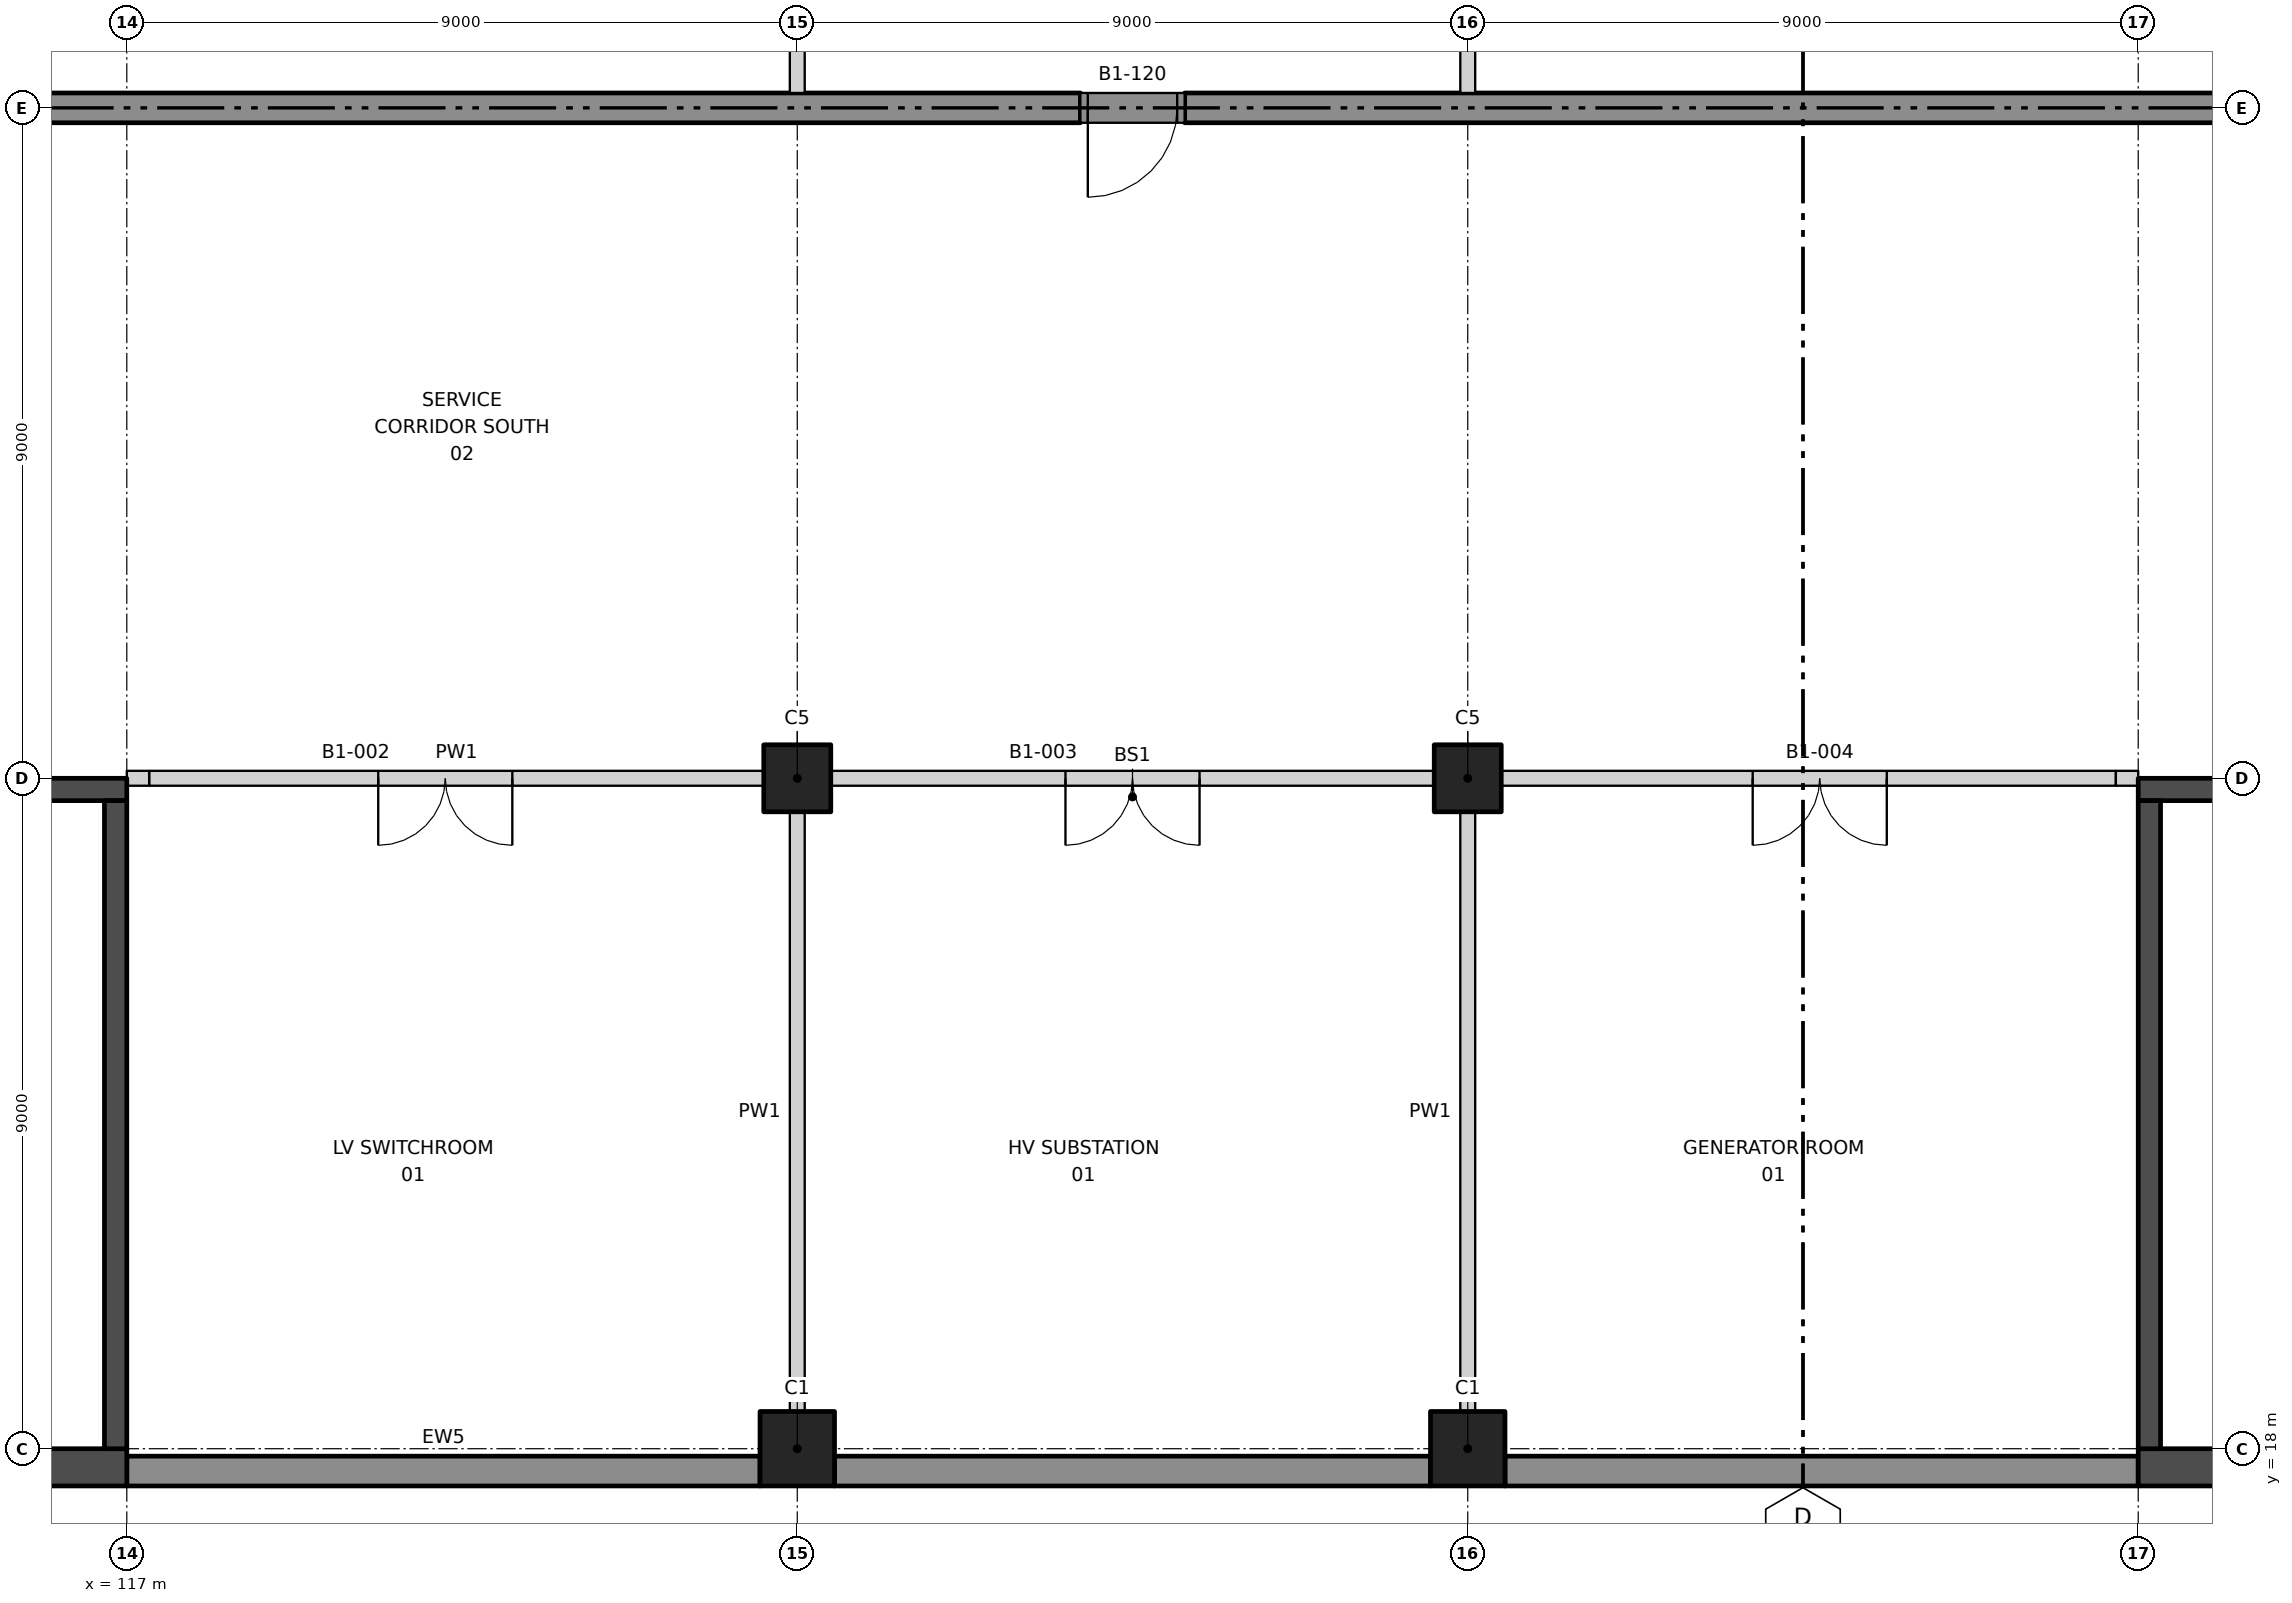
"""IFC4 building model, lengths in metres.
Left out: names, types, materials, properties, quantities, classifications, styles, units other than length and angle.
Written with IfcOpenShell. Run it as: python <this file> out.ifc"""

import sys

from ifc_helpers import new_model, si_unit, direction, frame, frame_2d, origin, origin_2d, place, context, subcontext, project, spatial, rectangle, extrude, element, fill, save


model = new_model("IFC4")
c1 = context("Model", 3, precision=1e-05, world=origin(), true_north=direction((0.0, 1.0)))
c2 = subcontext(c1, "Body", "Model", "MODEL_VIEW")
j1 = project(units=[si_unit("LENGTHUNIT", "METRE"), si_unit("PLANEANGLEUNIT", "RADIAN")], contexts=[c1])
p1 = place(None, origin())
s1 = spatial("IfcSite", under=j1, at=p1, CompositionType="ELEMENT")
p2 = place(p1, origin())
s2 = spatial("IfcBuilding", under=s1, at=p2, CompositionType="ELEMENT")
p3 = place(p2, frame((0.0, 0.0, -6.0)))
s3 = spatial("IfcBuildingStorey", under=s2, at=p3, CompositionType="ELEMENT", Elevation=-6.0)
for number, where, z_axis, x_axis in (
    (1, (126.0, 18.0, 0.0), (0.0, 0.0, 1.0), (1.0, 0.0, 0.0)),
    (2, (135.0, 18.0, 0.0), (0.0, 0.0, 1.0), (1.0, 0.0, 0.0)),
):
    element("IfcColumn", number, at=place(p3, frame(where, z_axis=z_axis, x_axis=x_axis)), inside=s3, PredefinedType="COLUMN", context=c2, shape_type="SweptSolid", body=[
        extrude(rectangle(XDim=1.0, YDim=1.0, at=origin_2d()), origin(), (0.0, 0.0, 1.0), 6.0),
    ])
for number, where, z_axis, x_axis in (
    (3, (126.0, 27.0, 0.0), (0.0, 0.0, 1.0), (1.0, 0.0, 0.0)),
    (4, (135.0, 27.0, 0.0), (0.0, 0.0, 1.0), (1.0, 0.0, 0.0)),
):
    element("IfcColumn", number, at=place(p3, frame(where, z_axis=z_axis, x_axis=x_axis)), inside=s3, PredefinedType="COLUMN", context=c2, shape_type="SweptSolid", body=[
        extrude(rectangle(XDim=0.9, YDim=0.9, at=origin_2d()), origin(), (0.0, 0.0, 1.0), 6.0),
    ])
for number, where, z_axis, x_axis in (
    (5, (90.0, 36.0, 0.0), (0.0, 0.0, 1.0), (1.0, 0.0, 0.0)),
    (6, (131.2, 36.0, 0.0), (0.0, 0.0, 1.0), (1.0, 0.0, 0.0)),
):
    element("IfcWall", number, at=place(p3, frame(where, z_axis=z_axis, x_axis=x_axis)), inside=s3, PredefinedType="SOLIDWALL", context=c2, shape_type="SweptSolid", body=[
        extrude(rectangle(XDim=39.8, YDim=0.4, at=frame_2d((19.9, 0.0))), origin(), (0.0, 0.0, 1.0), 6.0),
    ])
p4 = place(p3, frame((129.8, 36.0, 0.0), z_axis=(0.0, 0.0, 1.0), x_axis=(1.0, 0.0, 0.0)))
e7 = element("IfcWall", 7, at=p4, inside=s3, PredefinedType="SOLIDWALL", context=c2, shape_type="SweptSolid", body=[
    extrude(rectangle(XDim=1.4, YDim=0.4, at=frame_2d((0.7, 0.0))), origin(), (0.0, 0.0, 1.0), 5.0),
])
p5 = place(p4, frame((0.1, 0.0, 0.0)))
e8 = element("IfcOpeningElement", 8, at=p5, cuts=e7, PredefinedType="OPENING", context=c2, shape_type="SweptSolid", body=[
    extrude(rectangle(XDim=1.2, YDim=2.1, at=frame_2d((0.6, 1.05))), frame((0.0, 0.21, 0.0), z_axis=(0.0, -1.0, 0.0), x_axis=(1.0, 0.0, 0.0)), (0.0, 0.0, 1.0), 0.42),
])
p6 = place(p3, frame((117.3, 27.0, 0.0), z_axis=(0.0, 0.0, 1.0), x_axis=(1.0, 0.0, 0.0)))
e9 = element("IfcWall", 9, at=p6, inside=s3, PredefinedType="PARTITIONING", context=c2, shape_type="SweptSolid", body=[
    extrude(rectangle(XDim=8.25, YDim=0.2, at=frame_2d((4.125, 0.0))), origin(), (0.0, 0.0, 1.0), 4.65),
])
p7 = place(p6, frame((3.075, 0.0, 0.0)))
e10 = element("IfcOpeningElement", 10, at=p7, cuts=e9, PredefinedType="OPENING", context=c2, shape_type="SweptSolid", body=[
    extrude(rectangle(XDim=1.8, YDim=2.1, at=frame_2d((0.9, 1.05))), frame((0.0, 0.11, 0.0), z_axis=(0.0, -1.0, 0.0), x_axis=(1.0, 0.0, 0.0)), (0.0, 0.0, 1.0), 0.22),
])
p8 = place(p3, frame((126.45, 27.0, 0.0), z_axis=(0.0, 0.0, 1.0), x_axis=(1.0, 0.0, 0.0)))
e11 = element("IfcWall", 11, at=p8, inside=s3, PredefinedType="PARTITIONING", context=c2, shape_type="SweptSolid", body=[
    extrude(rectangle(XDim=8.1, YDim=0.2, at=frame_2d((4.05, 0.0))), origin(), (0.0, 0.0, 1.0), 4.65),
])
p9 = place(p8, frame((3.15, 0.0, 0.0)))
e12 = element("IfcOpeningElement", 12, at=p9, cuts=e11, PredefinedType="OPENING", context=c2, shape_type="SweptSolid", body=[
    extrude(rectangle(XDim=1.8, YDim=2.1, at=frame_2d((0.9, 1.05))), frame((0.0, 0.11, 0.0), z_axis=(0.0, -1.0, 0.0), x_axis=(1.0, 0.0, 0.0)), (0.0, 0.0, 1.0), 0.22),
])
p10 = place(p3, frame((135.45, 27.0, 0.0), z_axis=(0.0, 0.0, 1.0), x_axis=(1.0, 0.0, 0.0)))
e13 = element("IfcWall", 13, at=p10, inside=s3, PredefinedType="PARTITIONING", context=c2, shape_type="SweptSolid", body=[
    extrude(rectangle(XDim=8.25, YDim=0.2, at=frame_2d((4.125, 0.0))), origin(), (0.0, 0.0, 1.0), 4.65),
])
p11 = place(p10, frame((3.375, 0.0, 0.0)))
e14 = element("IfcOpeningElement", 14, at=p11, cuts=e13, PredefinedType="OPENING", context=c2, shape_type="SweptSolid", body=[
    extrude(rectangle(XDim=1.8, YDim=2.1, at=frame_2d((0.9, 1.05))), frame((0.0, 0.11, 0.0), z_axis=(0.0, -1.0, 0.0), x_axis=(1.0, 0.0, 0.0)), (0.0, 0.0, 1.0), 0.22),
])
p12 = place(p3, frame((126.0, 18.5, 0.0), z_axis=(0.0, 0.0, 1.0), x_axis=(0.0, 1.0, 0.0)))
e15 = element("IfcWall", 15, at=p12, inside=s3, PredefinedType="PARTITIONING", context=c2, shape_type="SweptSolid", body=[
    extrude(rectangle(XDim=8.05, YDim=0.2, at=frame_2d((4.025, 0.0))), origin(), (0.0, 0.0, 1.0), 4.65),
])
p13 = place(p3, frame((126.0, 36.2, 0.0), z_axis=(0.0, 0.0, 1.0), x_axis=(0.0, 1.0, 0.0)))
e16 = element("IfcWall", 16, at=p13, inside=s3, PredefinedType="PARTITIONING", context=c2, shape_type="SweptSolid", body=[
    extrude(rectangle(XDim=8.3, YDim=0.2, at=frame_2d((4.15, 0.0))), origin(), (0.0, 0.0, 1.0), 4.65),
])
p14 = place(p13, frame((3.3, 0.0, 0.0)))
e17 = element("IfcOpeningElement", 17, at=p14, cuts=e16, PredefinedType="OPENING", context=c2, shape_type="SweptSolid", body=[
    extrude(rectangle(XDim=1.0, YDim=2.1, at=frame_2d((0.5, 1.05))), frame((0.0, 0.11, 0.0), z_axis=(0.0, -1.0, 0.0), x_axis=(1.0, 0.0, 0.0)), (0.0, 0.0, 1.0), 0.22),
])
p15 = place(p3, frame((135.0, 18.5, 0.0), z_axis=(0.0, 0.0, 1.0), x_axis=(0.0, 1.0, 0.0)))
e18 = element("IfcWall", 18, at=p15, inside=s3, PredefinedType="PARTITIONING", context=c2, shape_type="SweptSolid", body=[
    extrude(rectangle(XDim=8.05, YDim=0.2, at=frame_2d((4.025, 0.0))), origin(), (0.0, 0.0, 1.0), 4.65),
])
p16 = place(p3, frame((135.0, 36.2, 0.0), z_axis=(0.0, 0.0, 1.0), x_axis=(0.0, 1.0, 0.0)))
e19 = element("IfcWall", 19, at=p16, inside=s3, PredefinedType="PARTITIONING", context=c2, shape_type="SweptSolid", body=[
    extrude(rectangle(XDim=8.3, YDim=0.2, at=frame_2d((4.15, 0.0))), origin(), (0.0, 0.0, 1.0), 4.65),
])
p17 = place(p16, frame((3.3, 0.0, 0.0)))
e20 = element("IfcOpeningElement", 20, at=p17, cuts=e19, PredefinedType="OPENING", context=c2, shape_type="SweptSolid", body=[
    extrude(rectangle(XDim=1.0, YDim=2.1, at=frame_2d((0.5, 1.05))), frame((0.0, 0.11, 0.0), z_axis=(0.0, -1.0, 0.0), x_axis=(1.0, 0.0, 0.0)), (0.0, 0.0, 1.0), 0.22),
])
p18 = place(p3, frame((117.0, 17.7, 0.0), z_axis=(0.0, 0.0, 1.0), x_axis=(1.0, 0.0, 0.0)))
e21 = element("IfcWall", 21, at=p18, inside=s3, PredefinedType="SOLIDWALL", context=c2, shape_type="SweptSolid", body=[
    extrude(rectangle(XDim=8.5, YDim=0.4, at=frame_2d((4.25, 0.0))), origin(), (0.0, 0.0, 1.0), 6.0),
])
p19 = place(p3, frame((126.5, 17.7, 0.0), z_axis=(0.0, 0.0, 1.0), x_axis=(1.0, 0.0, 0.0)))
e22 = element("IfcWall", 22, at=p19, inside=s3, PredefinedType="SOLIDWALL", context=c2, shape_type="SweptSolid", body=[
    extrude(rectangle(XDim=8.0, YDim=0.4, at=frame_2d((4.0, 0.0))), origin(), (0.0, 0.0, 1.0), 6.0),
])
p20 = place(p3, frame((135.5, 17.7, 0.0), z_axis=(0.0, 0.0, 1.0), x_axis=(1.0, 0.0, 0.0)))
e23 = element("IfcWall", 23, at=p20, inside=s3, PredefinedType="SOLIDWALL", context=c2, shape_type="SweptSolid", body=[
    extrude(rectangle(XDim=8.5, YDim=0.4, at=frame_2d((4.25, 0.0))), origin(), (0.0, 0.0, 1.0), 6.0),
])
p21 = place(p3, frame((117.0, 26.85, 0.0), z_axis=(0.0, 0.0, 1.0), x_axis=(-1.0, 0.0, 0.0)))
e24 = element("IfcWall", 24, at=p21, inside=s3, PredefinedType="SHEAR", context=c2, shape_type="SweptSolid", body=[
    extrude(rectangle(XDim=18.0, YDim=0.3, at=frame_2d((9.0, 0.0))), origin(), (0.0, 0.0, 1.0), 6.0),
])
p22 = place(p21, frame((1.5, 0.0, 0.0)))
e25 = element("IfcOpeningElement", 25, at=p22, cuts=e24, PredefinedType="OPENING", context=c2, shape_type="SweptSolid", body=[
    extrude(rectangle(XDim=1.2, YDim=2.1, at=frame_2d((0.6, 1.05))), frame((0.0, 0.16, 0.0), z_axis=(0.0, -1.0, 0.0), x_axis=(1.0, 0.0, 0.0)), (0.0, 0.0, 1.0), 0.32),
])
p23 = place(p3, frame((117.0, 17.75, 0.0), z_axis=(0.0, 0.0, 1.0), x_axis=(-1.0, 0.0, 0.0)))
e26 = element("IfcWall", 26, at=p23, inside=s3, PredefinedType="SHEAR", context=c2, shape_type="SweptSolid", body=[
    extrude(rectangle(XDim=18.0, YDim=0.5, at=frame_2d((9.0, 0.0))), origin(), (0.0, 0.0, 1.0), 6.0),
])
p24 = place(p3, frame((116.85, 26.7, 0.0), z_axis=(0.0, 0.0, 1.0), x_axis=(0.0, -1.0, 0.0)))
e27 = element("IfcWall", 27, at=p24, inside=s3, PredefinedType="SHEAR", context=c2, shape_type="SweptSolid", body=[
    extrude(rectangle(XDim=8.7, YDim=0.3, at=frame_2d((4.35, 0.0))), origin(), (0.0, 0.0, 1.0), 6.0),
])
p25 = place(p3, frame((144.0, 26.85, 0.0), z_axis=(0.0, 0.0, 1.0), x_axis=(1.0, 0.0, 0.0)))
e28 = element("IfcWall", 28, at=p25, inside=s3, PredefinedType="SHEAR", context=c2, shape_type="SweptSolid", body=[
    extrude(rectangle(XDim=18.0, YDim=0.3, at=frame_2d((9.0, 0.0))), origin(), (0.0, 0.0, 1.0), 6.0),
])
p26 = place(p25, frame((1.5, 0.0, 0.0)))
e29 = element("IfcOpeningElement", 29, at=p26, cuts=e28, PredefinedType="OPENING", context=c2, shape_type="SweptSolid", body=[
    extrude(rectangle(XDim=1.2, YDim=2.1, at=frame_2d((0.6, 1.05))), frame((0.0, 0.16, 0.0), z_axis=(0.0, -1.0, 0.0), x_axis=(1.0, 0.0, 0.0)), (0.0, 0.0, 1.0), 0.32),
])
p27 = place(p3, frame((144.0, 17.75, 0.0), z_axis=(0.0, 0.0, 1.0), x_axis=(1.0, 0.0, 0.0)))
e30 = element("IfcWall", 30, at=p27, inside=s3, PredefinedType="SHEAR", context=c2, shape_type="SweptSolid", body=[
    extrude(rectangle(XDim=18.0, YDim=0.5, at=frame_2d((9.0, 0.0))), origin(), (0.0, 0.0, 1.0), 6.0),
])
p28 = place(p3, frame((144.15, 26.7, 0.0), z_axis=(0.0, 0.0, 1.0), x_axis=(0.0, -1.0, 0.0)))
e31 = element("IfcWall", 31, at=p28, inside=s3, PredefinedType="SHEAR", context=c2, shape_type="SweptSolid", body=[
    extrude(rectangle(XDim=8.7, YDim=0.3, at=frame_2d((4.35, 0.0))), origin(), (0.0, 0.0, 1.0), 6.0),
])
for number, where, z_axis, x_axis in (
    (32, (117.0, 27.0, 0.0), (0.0, 0.0, 1.0), (1.0, 0.0, 0.0)),
    (33, (143.7, 27.0, 0.0), (0.0, 0.0, 1.0), (1.0, 0.0, 0.0)),
):
    element("IfcWall", number, at=place(p3, frame(where, z_axis=z_axis, x_axis=x_axis)), inside=s3, PredefinedType="PARTITIONING", context=c2, shape_type="SweptSolid", body=[
        extrude(rectangle(XDim=0.3, YDim=0.2, at=frame_2d((0.15, 0.0))), origin(), (0.0, 0.0, 1.0), 6.0),
    ])
p29 = place(p7, frame((1.8, 0.0, 0.0), z_axis=(0.0, 0.0, 1.0), x_axis=(-1.0, 0.0, 0.0)))
e34 = element("IfcDoor", 34, at=p29, inside=s3, OperationType="DOUBLE_DOOR_DOUBLE_SWING", PredefinedType="DOOR", context=c2, shape_type="SweptSolid", body=[
    extrude(rectangle(XDim=1.8, YDim=2.1, at=frame_2d((0.9, 1.05))), frame((0.0, 0.025, 0.0), z_axis=(0.0, -1.0, 0.0), x_axis=(1.0, 0.0, 0.0)), (0.0, 0.0, 1.0), 0.05),
])
fill(e10, e34)
p30 = place(p9, frame((1.8, 0.0, 0.0), z_axis=(0.0, 0.0, 1.0), x_axis=(-1.0, 0.0, 0.0)))
e35 = element("IfcDoor", 35, at=p30, inside=s3, OperationType="DOUBLE_DOOR_DOUBLE_SWING", PredefinedType="DOOR", context=c2, shape_type="SweptSolid", body=[
    extrude(rectangle(XDim=1.8, YDim=2.1, at=frame_2d((0.9, 1.05))), frame((0.0, 0.025, 0.0), z_axis=(0.0, -1.0, 0.0), x_axis=(1.0, 0.0, 0.0)), (0.0, 0.0, 1.0), 0.05),
])
fill(e12, e35)
p31 = place(p11, frame((1.8, 0.0, 0.0), z_axis=(0.0, 0.0, 1.0), x_axis=(-1.0, 0.0, 0.0)))
e36 = element("IfcDoor", 36, at=p31, inside=s3, OperationType="DOUBLE_DOOR_DOUBLE_SWING", PredefinedType="DOOR", context=c2, shape_type="SweptSolid", body=[
    extrude(rectangle(XDim=1.8, YDim=2.1, at=frame_2d((0.9, 1.05))), frame((0.0, 0.025, 0.0), z_axis=(0.0, -1.0, 0.0), x_axis=(1.0, 0.0, 0.0)), (0.0, 0.0, 1.0), 0.05),
])
fill(e14, e36)
p32 = place(p5, frame((1.2, 0.0, 0.0), z_axis=(0.0, 0.0, 1.0), x_axis=(-1.0, 0.0, 0.0)))
e37 = element("IfcDoor", 37, at=p32, inside=s3, OperationType="SINGLE_SWING_RIGHT", PredefinedType="DOOR", context=c2, shape_type="SweptSolid", body=[
    extrude(rectangle(XDim=1.2, YDim=2.1, at=frame_2d((0.6, 1.05))), frame((0.0, 0.025, 0.0), z_axis=(0.0, -1.0, 0.0), x_axis=(1.0, 0.0, 0.0)), (0.0, 0.0, 1.0), 0.05),
])
fill(e8, e37)
save(model, sys.argv[1])
